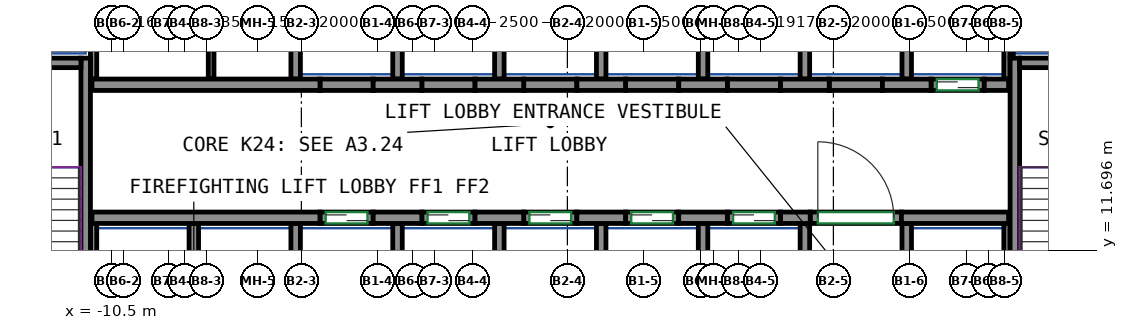
"""IFC4 building model, lengths in metres.
Left out: names, types, materials, properties, quantities, classifications, styles, units other than length and angle.
Written with IfcOpenShell. Run it as: python <this file> out.ifc"""

import sys

from ifc_helpers import new_model, si_unit, direction, frame, frame_2d, origin, place, context, subcontext, project, spatial, rectangle, extrude, source, transform, mapped, element, fill, save


model = new_model("IFC4")
c1 = context("Model", 3, precision=1e-05, world=origin(), true_north=direction((0.0, 1.0)))
c2 = subcontext(c1, "Body", "Model", "MODEL_VIEW")
j1 = project(units=[si_unit("LENGTHUNIT", "METRE"), si_unit("PLANEANGLEUNIT", "RADIAN")], contexts=[c1])
p1 = place(None, origin())
s1 = spatial("IfcSite", under=j1, at=p1, CompositionType="ELEMENT")
p2 = place(p1, origin())
s2 = spatial("IfcBuilding", under=s1, at=p2, CompositionType="ELEMENT")
p3 = place(p2, frame((0.0, 0.0, 100.6)))
s3 = spatial("IfcBuildingStorey", under=s2, at=p3, CompositionType="ELEMENT", Elevation=100.6)
m1 = source(origin(), c2, "Body", "SweptSolid", [
    extrude(rectangle(XDim=7.75, YDim=0.25, at=frame_2d((3.875, 0.0))), origin(), (0.0, 0.0, 1.0), 3.72),
])
p4 = place(p3, frame((-11.175, 9.0, 0.0), z_axis=(0.0, 0.0, 1.0), x_axis=(0.0, 1.0, 0.0)))
e1 = element("IfcWall", 1, at=p4, inside=s3, PredefinedType="SHEAR", context=c2, shape_type="MappedRepresentation", body=[
    mapped(m1, transform((0.0, 0.0, 0.0))),
])
m2 = source(origin(), c2, "Body", "SweptSolid", [
    extrude(rectangle(XDim=3.7, YDim=0.25, at=frame_2d((1.85, 0.0))), origin(), (0.0, 0.0, 1.0), 3.72),
])
p5 = place(p3, frame((-15.0, 16.625, 0.0), z_axis=(0.0, 0.0, 1.0), x_axis=(1.0, 0.0, 0.0)))
e2 = element("IfcWall", 2, at=p5, inside=s3, PredefinedType="SHEAR", context=c2, shape_type="MappedRepresentation", body=[
    mapped(m2, transform((0.0, 0.0, 0.0))),
])
p6 = place(p3, frame((13.275, 9.0, 0.0), z_axis=(0.0, 0.0, 1.0), x_axis=(0.0, 1.0, 0.0)))
e3 = element("IfcWall", 3, at=p6, inside=s3, PredefinedType="SHEAR", context=c2, shape_type="MappedRepresentation", body=[
    mapped(m1, transform((0.0, 0.0, 0.0))),
])
m3 = source(origin(), c2, "Body", "SweptSolid", [
    extrude(rectangle(XDim=3.7, YDim=0.25, at=frame_2d((1.85, 0.0))), origin(), (0.0, 0.0, 1.0), 3.72),
])
p7 = place(p3, frame((13.4, 16.625, 0.0), z_axis=(0.0, 0.0, 1.0), x_axis=(1.0, 0.0, 0.0)))
e4 = element("IfcWall", 4, at=p7, inside=s3, PredefinedType="SHEAR", context=c2, shape_type="MappedRepresentation", body=[
    mapped(m3, transform((0.0, 0.0, 0.0))),
])
m4 = source(origin(), c2, "Body", "SweptSolid", [
    extrude(rectangle(XDim=6.0, YDim=0.3, at=frame_2d((3.0, 0.0))), origin(), (0.0, 0.0, 1.0), 3.72),
])
p8 = place(p3, frame((-11.01, 12.55, 0.0), z_axis=(0.0, 0.0, 1.0), x_axis=(1.0, 0.0, 0.0)))
e5 = element("IfcWall", 5, at=p8, inside=s3, PredefinedType="SHEAR", context=c2, shape_type="MappedRepresentation", body=[
    mapped(m4, transform((0.0, 0.0, 0.0))),
])
m5 = source(origin(), c2, "Body", "SweptSolid", [
    extrude(rectangle(XDim=1.28, YDim=0.3, at=frame_2d((0.64, 0.0))), origin(), (0.0, 0.0, 1.0), 3.72),
])
for number, where, z_axis, x_axis in (
    (6, (-3.61, 12.55, 0.0), (0.0, 0.0, 1.0), (1.0, 0.0, 0.0)),
    (7, (-0.93, 12.55, 0.0), (0.0, 0.0, 1.0), (1.0, 0.0, 0.0)),
    (8, (1.75, 12.55, 0.0), (0.0, 0.0, 1.0), (1.0, 0.0, 0.0)),
    (9, (4.43, 12.55, 0.0), (0.0, 0.0, 1.0), (1.0, 0.0, 0.0)),
):
    element("IfcWall", number, at=place(p3, frame(where, z_axis=z_axis, x_axis=x_axis)), inside=s3, PredefinedType="SHEAR", context=c2, shape_type="MappedRepresentation", body=[
        mapped(m5, transform((0.0, 0.0, 0.0))),
    ])
m6 = source(origin(), c2, "Body", "SweptSolid", [
    extrude(rectangle(XDim=0.78, YDim=0.3, at=frame_2d((0.39, 0.0))), origin(), (0.0, 0.0, 1.0), 3.72),
])
p9 = place(p3, frame((7.11, 12.55, 0.0), z_axis=(0.0, 0.0, 1.0), x_axis=(1.0, 0.0, 0.0)))
e10 = element("IfcWall", 10, at=p9, inside=s3, PredefinedType="SHEAR", context=c2, shape_type="MappedRepresentation", body=[
    mapped(m6, transform((0.0, 0.0, 0.0))),
])
m7 = source(origin(), c2, "Body", "SweptSolid", [
    extrude(rectangle(XDim=2.82, YDim=0.3, at=frame_2d((1.41, 0.0))), origin(), (0.0, 0.0, 1.0), 3.72),
])
p10 = place(p3, frame((10.29, 12.55, 0.0), z_axis=(0.0, 0.0, 1.0), x_axis=(1.0, 0.0, 0.0)))
e11 = element("IfcWall", 11, at=p10, inside=s3, PredefinedType="SHEAR", context=c2, shape_type="MappedRepresentation", body=[
    mapped(m7, transform((0.0, 0.0, 0.0))),
])
p11 = place(p3, frame((-11.01, 16.05, 0.0), z_axis=(0.0, 0.0, 1.0), x_axis=(1.0, 0.0, 0.0)))
e12 = element("IfcWall", 12, at=p11, inside=s3, PredefinedType="SHEAR", context=c2, shape_type="MappedRepresentation", body=[
    mapped(m4, transform((0.0, 0.0, 0.0))),
])
for number, where, z_axis, x_axis in (
    (13, (-3.61, 16.05, 0.0), (0.0, 0.0, 1.0), (1.0, 0.0, 0.0)),
    (14, (-0.93, 16.05, 0.0), (0.0, 0.0, 1.0), (1.0, 0.0, 0.0)),
    (15, (1.75, 16.05, 0.0), (0.0, 0.0, 1.0), (1.0, 0.0, 0.0)),
    (16, (4.43, 16.05, 0.0), (0.0, 0.0, 1.0), (1.0, 0.0, 0.0)),
):
    element("IfcWall", number, at=place(p3, frame(where, z_axis=z_axis, x_axis=x_axis)), inside=s3, PredefinedType="SHEAR", context=c2, shape_type="MappedRepresentation", body=[
        mapped(m5, transform((0.0, 0.0, 0.0))),
    ])
m8 = source(origin(), c2, "Body", "SweptSolid", [
    extrude(rectangle(XDim=1.28, YDim=0.3, at=frame_2d((0.64, 0.0))), origin(), (0.0, 0.0, 1.0), 3.72),
])
p12 = place(p3, frame((7.11, 16.05, 0.0), z_axis=(0.0, 0.0, 1.0), x_axis=(1.0, 0.0, 0.0)))
e17 = element("IfcWall", 17, at=p12, inside=s3, PredefinedType="SHEAR", context=c2, shape_type="MappedRepresentation", body=[
    mapped(m8, transform((0.0, 0.0, 0.0))),
])
p13 = place(p3, frame((9.79, 16.05, 0.0), z_axis=(0.0, 0.0, 1.0), x_axis=(1.0, 0.0, 0.0)))
e18 = element("IfcWall", 18, at=p13, inside=s3, PredefinedType="SHEAR", context=c2, shape_type="MappedRepresentation", body=[
    mapped(m5, transform((0.0, 0.0, 0.0))),
])
m9 = source(origin(), c2, "Body", "SweptSolid", [
    extrude(rectangle(XDim=0.64, YDim=0.3, at=frame_2d((0.32, 0.0))), origin(), (0.0, 0.0, 1.0), 3.72),
])
p14 = place(p3, frame((12.47, 16.05, 0.0), z_axis=(0.0, 0.0, 1.0), x_axis=(1.0, 0.0, 0.0)))
e19 = element("IfcWall", 19, at=p14, inside=s3, PredefinedType="SHEAR", context=c2, shape_type="MappedRepresentation", body=[
    mapped(m9, transform((0.0, 0.0, 0.0))),
])
m10 = source(origin(), c2, "Body", "SweptSolid", [
    extrude(rectangle(XDim=1.4, YDim=0.3, at=frame_2d((0.7, 0.0))), origin(), (0.0, 0.0, 1.0), 3.72),
])
p15 = place(p3, frame((-5.01, 12.55, 0.0), z_axis=(0.0, 0.0, 1.0), x_axis=(1.0, 0.0, 0.0)))
e20 = element("IfcWall", 20, at=p15, inside=s3, PredefinedType="PARTITIONING", context=c2, shape_type="MappedRepresentation", body=[
    mapped(m10, transform((0.0, 0.0, 0.0))),
])
p16 = place(p15, frame((0.15, 0.0, 0.0)))
e21 = element("IfcOpeningElement", 21, at=p16, cuts=e20, PredefinedType="OPENING", context=c2, shape_type="SweptSolid", body=[
    extrude(rectangle(XDim=1.1, YDim=2.1, at=frame_2d((0.55, 1.05))), frame((0.0, 0.16, 0.0), z_axis=(0.0, -1.0, 0.0), x_axis=(1.0, 0.0, 0.0)), (0.0, 0.0, 1.0), 0.32),
])
m11 = source(origin(), c2, "Body", "SweptSolid", [
    extrude(rectangle(XDim=1.4, YDim=0.3, at=frame_2d((0.7, 0.0))), origin(), (0.0, 0.0, 1.0), 3.72),
])
p17 = place(p3, frame((-2.33, 12.55, 0.0), z_axis=(0.0, 0.0, 1.0), x_axis=(1.0, 0.0, 0.0)))
e22 = element("IfcWall", 22, at=p17, inside=s3, PredefinedType="PARTITIONING", context=c2, shape_type="MappedRepresentation", body=[
    mapped(m11, transform((0.0, 0.0, 0.0))),
])
p18 = place(p17, frame((0.15, 0.0, 0.0)))
e23 = element("IfcOpeningElement", 23, at=p18, cuts=e22, PredefinedType="OPENING", context=c2, shape_type="SweptSolid", body=[
    extrude(rectangle(XDim=1.1, YDim=2.1, at=frame_2d((0.55, 1.05))), frame((0.0, 0.16, 0.0), z_axis=(0.0, -1.0, 0.0), x_axis=(1.0, 0.0, 0.0)), (0.0, 0.0, 1.0), 0.32),
])
p19 = place(p3, frame((0.35, 12.55, 0.0), z_axis=(0.0, 0.0, 1.0), x_axis=(1.0, 0.0, 0.0)))
e24 = element("IfcWall", 24, at=p19, inside=s3, PredefinedType="PARTITIONING", context=c2, shape_type="MappedRepresentation", body=[
    mapped(m10, transform((0.0, 0.0, 0.0))),
])
p20 = place(p19, frame((0.15, 0.0, 0.0)))
e25 = element("IfcOpeningElement", 25, at=p20, cuts=e24, PredefinedType="OPENING", context=c2, shape_type="SweptSolid", body=[
    extrude(rectangle(XDim=1.1, YDim=2.1, at=frame_2d((0.55, 1.05))), frame((0.0, 0.16, 0.0), z_axis=(0.0, -1.0, 0.0), x_axis=(1.0, 0.0, 0.0)), (0.0, 0.0, 1.0), 0.32),
])
p21 = place(p3, frame((3.03, 12.55, 0.0), z_axis=(0.0, 0.0, 1.0), x_axis=(1.0, 0.0, 0.0)))
e26 = element("IfcWall", 26, at=p21, inside=s3, PredefinedType="PARTITIONING", context=c2, shape_type="MappedRepresentation", body=[
    mapped(m10, transform((0.0, 0.0, 0.0))),
])
p22 = place(p21, frame((0.15, 0.0, 0.0)))
e27 = element("IfcOpeningElement", 27, at=p22, cuts=e26, PredefinedType="OPENING", context=c2, shape_type="SweptSolid", body=[
    extrude(rectangle(XDim=1.1, YDim=2.1, at=frame_2d((0.55, 1.05))), frame((0.0, 0.16, 0.0), z_axis=(0.0, -1.0, 0.0), x_axis=(1.0, 0.0, 0.0)), (0.0, 0.0, 1.0), 0.32),
])
p23 = place(p3, frame((5.71, 12.55, 0.0), z_axis=(0.0, 0.0, 1.0), x_axis=(1.0, 0.0, 0.0)))
e28 = element("IfcWall", 28, at=p23, inside=s3, PredefinedType="PARTITIONING", context=c2, shape_type="MappedRepresentation", body=[
    mapped(m11, transform((0.0, 0.0, 0.0))),
])
p24 = place(p23, frame((0.15, 0.0, 0.0)))
e29 = element("IfcOpeningElement", 29, at=p24, cuts=e28, PredefinedType="OPENING", context=c2, shape_type="SweptSolid", body=[
    extrude(rectangle(XDim=1.1, YDim=2.1, at=frame_2d((0.55, 1.05))), frame((0.0, 0.16, 0.0), z_axis=(0.0, -1.0, 0.0), x_axis=(1.0, 0.0, 0.0)), (0.0, 0.0, 1.0), 0.32),
])
p25 = place(p3, frame((11.07, 16.05, 0.0), z_axis=(0.0, 0.0, 1.0), x_axis=(1.0, 0.0, 0.0)))
e30 = element("IfcWall", 30, at=p25, inside=s3, PredefinedType="PARTITIONING", context=c2, shape_type="MappedRepresentation", body=[
    mapped(m10, transform((0.0, 0.0, 0.0))),
])
p26 = place(p25, frame((0.15, 0.0, 0.0)))
e31 = element("IfcOpeningElement", 31, at=p26, cuts=e30, PredefinedType="OPENING", context=c2, shape_type="SweptSolid", body=[
    extrude(rectangle(XDim=1.1, YDim=2.1, at=frame_2d((0.55, 1.05))), frame((0.0, 0.16, 0.0), z_axis=(0.0, -1.0, 0.0), x_axis=(1.0, 0.0, 0.0)), (0.0, 0.0, 1.0), 0.32),
])
m12 = source(origin(), c2, "Body", "SweptSolid", [
    extrude(rectangle(XDim=2.4, YDim=0.3, at=frame_2d((1.2, 0.0))), origin(), (0.0, 0.0, 1.0), 3.72),
])
p27 = place(p3, frame((7.89, 12.55, 0.0), z_axis=(0.0, 0.0, 1.0), x_axis=(1.0, 0.0, 0.0)))
e32 = element("IfcWall", 32, at=p27, inside=s3, PredefinedType="PARTITIONING", context=c2, shape_type="MappedRepresentation", body=[
    mapped(m12, transform((0.0, 0.0, 0.0))),
])
p28 = place(p27, frame((0.2, 0.0, 0.0)))
e33 = element("IfcOpeningElement", 33, at=p28, cuts=e32, PredefinedType="OPENING", context=c2, shape_type="SweptSolid", body=[
    extrude(rectangle(XDim=2.0, YDim=2.1, at=frame_2d((1.0, 1.05))), frame((0.0, 0.16, 0.0), z_axis=(0.0, -1.0, 0.0), x_axis=(1.0, 0.0, 0.0)), (0.0, 0.0, 1.0), 0.32),
])
p29 = place(p3, frame((-5.01, 16.05, 0.0), z_axis=(0.0, 0.0, 1.0), x_axis=(1.0, 0.0, 0.0)))
e34 = element("IfcWall", 34, at=p29, inside=s3, PredefinedType="PARTITIONING", context=c2, shape_type="MappedRepresentation", body=[
    mapped(m10, transform((0.0, 0.0, 0.0))),
])
p30 = place(p3, frame((-2.33, 16.05, 0.0), z_axis=(0.0, 0.0, 1.0), x_axis=(1.0, 0.0, 0.0)))
e35 = element("IfcWall", 35, at=p30, inside=s3, PredefinedType="PARTITIONING", context=c2, shape_type="MappedRepresentation", body=[
    mapped(m11, transform((0.0, 0.0, 0.0))),
])
for number, where, z_axis, x_axis in (
    (36, (0.35, 16.05, 0.0), (0.0, 0.0, 1.0), (1.0, 0.0, 0.0)),
    (37, (3.03, 16.05, 0.0), (0.0, 0.0, 1.0), (1.0, 0.0, 0.0)),
):
    element("IfcWall", number, at=place(p3, frame(where, z_axis=z_axis, x_axis=x_axis)), inside=s3, PredefinedType="PARTITIONING", context=c2, shape_type="MappedRepresentation", body=[
        mapped(m10, transform((0.0, 0.0, 0.0))),
    ])
for number, where, z_axis, x_axis in (
    (38, (5.71, 16.05, 0.0), (0.0, 0.0, 1.0), (1.0, 0.0, 0.0)),
    (39, (8.39, 16.05, 0.0), (0.0, 0.0, 1.0), (1.0, 0.0, 0.0)),
):
    element("IfcWall", number, at=place(p3, frame(where, z_axis=z_axis, x_axis=x_axis)), inside=s3, PredefinedType="PARTITIONING", context=c2, shape_type="MappedRepresentation", body=[
        mapped(m11, transform((0.0, 0.0, 0.0))),
    ])
m13 = source(origin(), c2, "Body", "SweptSolid", [
    extrude(rectangle(XDim=3.275, YDim=0.165, at=frame_2d((1.638, 0.0))), origin(), (0.0, 0.0, 1.0), 3.72),
])
p31 = place(p3, frame((13.067, 16.2, 0.0), z_axis=(0.0, 0.0, 1.0), x_axis=(0.0, 1.0, 0.0)))
e40 = element("IfcWall", 40, at=p31, inside=s3, PredefinedType="PARTITIONING", context=c2, shape_type="MappedRepresentation", body=[
    mapped(m13, transform((0.0, 0.0, 0.0))),
])
m14 = source(origin(), c2, "Body", "SweptSolid", [
    extrude(rectangle(XDim=4.8, YDim=0.165, at=frame_2d((2.4, 0.0))), origin(), (0.0, 0.0, 1.0), 3.72),
])
p32 = place(p3, frame((-10.968, 16.2, 0.0), z_axis=(0.0, 0.0, 1.0), x_axis=(0.0, 1.0, 0.0)))
e41 = element("IfcWall", 41, at=p32, inside=s3, PredefinedType="PARTITIONING", context=c2, shape_type="MappedRepresentation", body=[
    mapped(m14, transform((0.0, 0.0, 0.0))),
])
m15 = source(origin(), c2, "Body", "SweptSolid", [
    extrude(rectangle(XDim=3.275, YDim=0.25, at=frame_2d((1.638, 0.0))), origin(), (0.0, 0.0, 1.0), 3.72),
])
p33 = place(p3, frame((10.43, 16.2, 0.0), z_axis=(0.0, 0.0, 1.0), x_axis=(0.0, 1.0, 0.0)))
e42 = element("IfcWall", 42, at=p33, inside=s3, PredefinedType="PARTITIONING", context=c2, shape_type="MappedRepresentation", body=[
    mapped(m15, transform((0.0, 0.0, 0.0))),
])
m16 = source(origin(), c2, "Body", "SweptSolid", [
    extrude(rectangle(XDim=2.725, YDim=0.085, at=frame_2d((1.363, 0.0))), origin(), (0.0, 0.0, 1.0), 3.72),
])
p34 = place(p3, frame((13.192, 16.75, 0.0), z_axis=(0.0, 0.0, 1.0), x_axis=(0.0, 1.0, 0.0)))
e43 = element("IfcWall", 43, at=p34, inside=s3, PredefinedType="PARTITIONING", context=c2, shape_type="MappedRepresentation", body=[
    mapped(m16, transform((0.0, 0.0, 0.0))),
])
for number, where, z_axis, x_axis in (
    (44, (2.39, 16.2, 0.0), (0.0, 0.0, 1.0), (0.0, 1.0, 0.0)),
    (45, (5.07, 16.2, 0.0), (0.0, 0.0, 1.0), (0.0, 1.0, 0.0)),
    (46, (7.75, 16.2, 0.0), (0.0, 0.0, 1.0), (0.0, 1.0, 0.0)),
    (47, (-0.29, 16.2, 0.0), (0.0, 0.0, 1.0), (0.0, 1.0, 0.0)),
    (48, (-2.97, 16.2, 0.0), (0.0, 0.0, 1.0), (0.0, 1.0, 0.0)),
    (49, (-5.65, 16.2, 0.0), (0.0, 0.0, 1.0), (0.0, 1.0, 0.0)),
):
    element("IfcWall", number, at=place(p3, frame(where, z_axis=z_axis, x_axis=x_axis)), inside=s3, PredefinedType="PARTITIONING", context=c2, shape_type="MappedRepresentation", body=[
        mapped(m15, transform((0.0, 0.0, 0.0))),
    ])
m17 = source(origin(), c2, "Body", "SweptSolid", [
    extrude(rectangle(XDim=3.4, YDim=0.25, at=frame_2d((1.7, 0.0))), origin(), (0.0, 0.0, 1.0), 3.72),
])
p35 = place(p3, frame((10.43, 9.0, 0.0), z_axis=(0.0, 0.0, 1.0), x_axis=(0.0, 1.0, 0.0)))
e50 = element("IfcWall", 50, at=p35, inside=s3, PredefinedType="PARTITIONING", context=c2, shape_type="MappedRepresentation", body=[
    mapped(m17, transform((0.0, 0.0, 0.0))),
])
m18 = source(origin(), c2, "Body", "SweptSolid", [
    extrude(rectangle(XDim=3.4, YDim=0.165, at=frame_2d((1.7, 0.0))), origin(), (0.0, 0.0, 1.0), 3.72),
])
p36 = place(p3, frame((13.067, 9.0, 0.0), z_axis=(0.0, 0.0, 1.0), x_axis=(0.0, 1.0, 0.0)))
e51 = element("IfcWall", 51, at=p36, inside=s3, PredefinedType="PARTITIONING", context=c2, shape_type="MappedRepresentation", body=[
    mapped(m18, transform((0.0, 0.0, 0.0))),
])
for number, where, z_axis, x_axis in (
    (52, (2.39, 9.0, 0.0), (0.0, 0.0, 1.0), (0.0, 1.0, 0.0)),
    (53, (5.07, 9.0, 0.0), (0.0, 0.0, 1.0), (0.0, 1.0, 0.0)),
    (54, (7.75, 9.0, 0.0), (0.0, 0.0, 1.0), (0.0, 1.0, 0.0)),
    (55, (-0.29, 9.0, 0.0), (0.0, 0.0, 1.0), (0.0, 1.0, 0.0)),
):
    element("IfcWall", number, at=place(p3, frame(where, z_axis=z_axis, x_axis=x_axis)), inside=s3, PredefinedType="PARTITIONING", context=c2, shape_type="MappedRepresentation", body=[
        mapped(m17, transform((0.0, 0.0, 0.0))),
    ])
p37 = place(p3, frame((-10.968, 9.0, 0.0), z_axis=(0.0, 0.0, 1.0), x_axis=(0.0, 1.0, 0.0)))
e56 = element("IfcWall", 56, at=p37, inside=s3, PredefinedType="PARTITIONING", context=c2, shape_type="MappedRepresentation", body=[
    mapped(m18, transform((0.0, 0.0, 0.0))),
])
for number, where, z_axis, x_axis in (
    (57, (-2.97, 9.0, 0.0), (0.0, 0.0, 1.0), (0.0, 1.0, 0.0)),
    (58, (-5.65, 9.0, 0.0), (0.0, 0.0, 1.0), (0.0, 1.0, 0.0)),
    (59, (-8.33, 9.0, 0.0), (0.0, 0.0, 1.0), (0.0, 1.0, 0.0)),
):
    element("IfcWall", number, at=place(p3, frame(where, z_axis=z_axis, x_axis=x_axis)), inside=s3, PredefinedType="PARTITIONING", context=c2, shape_type="MappedRepresentation", body=[
        mapped(m17, transform((0.0, 0.0, 0.0))),
    ])
m19 = source(origin(), c2, "Body", "SweptSolid", [
    extrude(rectangle(XDim=4.8, YDim=0.15, at=frame_2d((2.4, 0.0))), origin(), (0.0, 0.0, 1.0), 3.72),
])
p38 = place(p3, frame((-7.875, 16.2, 0.0), z_axis=(0.0, 0.0, 1.0), x_axis=(0.0, 1.0, 0.0)))
e60 = element("IfcWall", 60, at=p38, inside=s3, PredefinedType="PARTITIONING", context=c2, shape_type="MappedRepresentation", body=[
    mapped(m19, transform((0.0, 0.0, 0.0))),
])
p39 = place(p28, origin())
e61 = element("IfcDoor", 61, at=p39, inside=s3, OperationType="DOUBLE_DOOR_SINGLE_SWING", PredefinedType="DOOR", context=c2, shape_type="SweptSolid", body=[
    extrude(rectangle(XDim=2.0, YDim=2.1, at=frame_2d((1.0, 1.05))), frame((0.0, 0.025, 0.0), z_axis=(0.0, -1.0, 0.0), x_axis=(1.0, 0.0, 0.0)), (0.0, 0.0, 1.0), 0.05),
])
fill(e33, e61)
p40 = place(p16, origin())
e62 = element("IfcDoor", 62, at=p40, inside=s3, OperationType="DOUBLE_DOOR_SLIDING", PredefinedType="DOOR", context=c2, shape_type="SweptSolid", body=[
    extrude(rectangle(XDim=1.1, YDim=2.1, at=frame_2d((0.55, 1.05))), frame((0.0, 0.025, 0.0), z_axis=(0.0, -1.0, 0.0), x_axis=(1.0, 0.0, 0.0)), (0.0, 0.0, 1.0), 0.05),
])
fill(e21, e62)
p41 = place(p18, origin())
e63 = element("IfcDoor", 63, at=p41, inside=s3, OperationType="DOUBLE_DOOR_SLIDING", PredefinedType="DOOR", context=c2, shape_type="SweptSolid", body=[
    extrude(rectangle(XDim=1.1, YDim=2.1, at=frame_2d((0.55, 1.05))), frame((0.0, 0.025, 0.0), z_axis=(0.0, -1.0, 0.0), x_axis=(1.0, 0.0, 0.0)), (0.0, 0.0, 1.0), 0.05),
])
fill(e23, e63)
p42 = place(p20, origin())
e64 = element("IfcDoor", 64, at=p42, inside=s3, OperationType="DOUBLE_DOOR_SLIDING", PredefinedType="DOOR", context=c2, shape_type="SweptSolid", body=[
    extrude(rectangle(XDim=1.1, YDim=2.1, at=frame_2d((0.55, 1.05))), frame((0.0, 0.025, 0.0), z_axis=(0.0, -1.0, 0.0), x_axis=(1.0, 0.0, 0.0)), (0.0, 0.0, 1.0), 0.05),
])
fill(e25, e64)
p43 = place(p22, origin())
e65 = element("IfcDoor", 65, at=p43, inside=s3, OperationType="DOUBLE_DOOR_SLIDING", PredefinedType="DOOR", context=c2, shape_type="SweptSolid", body=[
    extrude(rectangle(XDim=1.1, YDim=2.1, at=frame_2d((0.55, 1.05))), frame((0.0, 0.025, 0.0), z_axis=(0.0, -1.0, 0.0), x_axis=(1.0, 0.0, 0.0)), (0.0, 0.0, 1.0), 0.05),
])
fill(e27, e65)
p44 = place(p24, origin())
e66 = element("IfcDoor", 66, at=p44, inside=s3, OperationType="DOUBLE_DOOR_SLIDING", PredefinedType="DOOR", context=c2, shape_type="SweptSolid", body=[
    extrude(rectangle(XDim=1.1, YDim=2.1, at=frame_2d((0.55, 1.05))), frame((0.0, 0.025, 0.0), z_axis=(0.0, -1.0, 0.0), x_axis=(1.0, 0.0, 0.0)), (0.0, 0.0, 1.0), 0.05),
])
fill(e29, e66)
p45 = place(p26, origin())
e67 = element("IfcDoor", 67, at=p45, inside=s3, OperationType="DOUBLE_DOOR_SLIDING", PredefinedType="DOOR", context=c2, shape_type="SweptSolid", body=[
    extrude(rectangle(XDim=1.1, YDim=2.1, at=frame_2d((0.55, 1.05))), frame((0.0, 0.025, 0.0), z_axis=(0.0, -1.0, 0.0), x_axis=(1.0, 0.0, 0.0)), (0.0, 0.0, 1.0), 0.05),
])
fill(e31, e67)
save(model, sys.argv[1])
